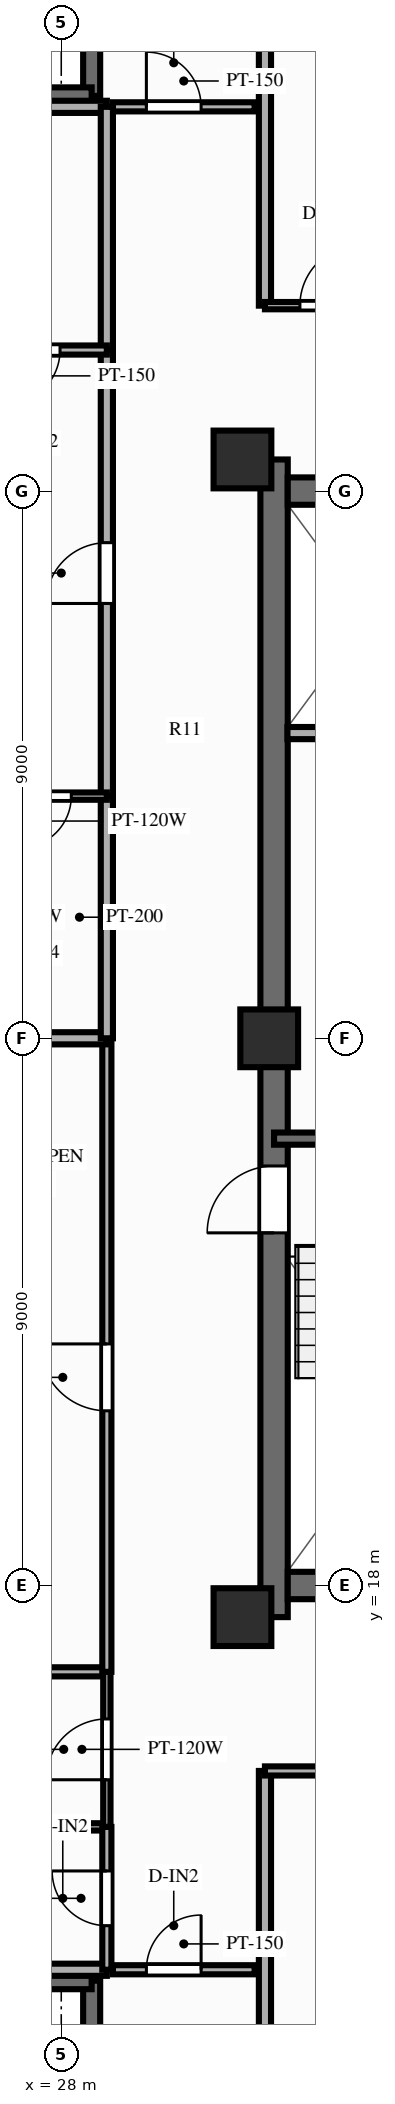
"""IFC4 building model, lengths in metres.
Left out: names, types, materials, properties, quantities, classifications, styles, units other than length and angle.
Written with IfcOpenShell. Run it as: python <this file> out.ifc"""

import sys

from ifc_helpers import new_model, si_unit, direction, frame, frame_2d, origin, origin_2d, place, context, subcontext, project, spatial, rectangle, extrude, source, transform, mapped, element, fill, save


model = new_model("IFC4")
c1 = context("Model", 3, precision=1e-05, world=origin(), true_north=direction((0.0, 1.0)))
c2 = subcontext(c1, "Body", "Model", "MODEL_VIEW")
j1 = project(units=[si_unit("LENGTHUNIT", "METRE"), si_unit("PLANEANGLEUNIT", "RADIAN")], contexts=[c1])
p1 = place(None, origin())
s1 = spatial("IfcSite", under=j1, at=p1, CompositionType="ELEMENT")
p2 = place(p1, origin())
s2 = spatial("IfcBuilding", under=s1, at=p2, CompositionType="ELEMENT")
p3 = place(p2, frame((0.0, 0.0, 249.0)))
s3 = spatial("IfcBuildingStorey", under=s2, at=p3, CompositionType="ELEMENT", Elevation=249.0)
p4 = place(p3, frame((31.5, 17.48, 0.0), z_axis=(0.0, 0.0, 1.0), x_axis=(0.0, 1.0, 0.0)))
e1 = element("IfcWall", 1, at=p4, inside=s3, PredefinedType="SHEAR", context=c2, shape_type="SweptSolid", body=[
    extrude(rectangle(XDim=19.04, YDim=0.45, at=frame_2d((9.52, 0.0))), origin(), (0.0, 0.0, 1.0), 3.2),
])
p5 = place(p4, frame((6.32, 0.0, 0.0)))
e2 = element("IfcOpeningElement", 2, at=p5, cuts=e1, PredefinedType="OPENING", context=c2, shape_type="SweptSolid", body=[
    extrude(rectangle(XDim=1.1, YDim=2.15, at=frame_2d((0.55, 1.075))), frame((0.0, 0.237, 0.0), z_axis=(0.0, -1.0, 0.0), x_axis=(1.0, 0.0, 0.0)), (0.0, 0.0, 1.0), 0.474),
])
p6 = place(p3, frame((31.725, 18.0, 0.0), z_axis=(0.0, 0.0, 1.0), x_axis=(1.0, 0.0, 0.0)))
e3 = element("IfcWall", 3, at=p6, inside=s3, PredefinedType="SHEAR", context=c2, shape_type="SweptSolid", body=[
    extrude(rectangle(XDim=12.55, YDim=0.45, at=frame_2d((6.275, 0.0))), origin(), (0.0, 0.0, 1.0), 3.2),
])
p7 = place(p3, frame((31.725, 36.0, 0.0), z_axis=(0.0, 0.0, 1.0), x_axis=(1.0, 0.0, 0.0)))
e4 = element("IfcWall", 4, at=p7, inside=s3, PredefinedType="SHEAR", context=c2, shape_type="SweptSolid", body=[
    extrude(rectangle(XDim=12.55, YDim=0.45, at=frame_2d((6.275, 0.0))), origin(), (0.0, 0.0, 1.0), 3.2),
])
p8 = place(p7, frame((5.225, 0.0, 0.0), z_axis=(0.0, 0.0, 1.0), x_axis=(-1.0, 0.0, 0.0)))
e5 = element("IfcOpeningElement", 5, at=p8, cuts=e4, PredefinedType="OPENING", context=c2, shape_type="SweptSolid", body=[
    extrude(rectangle(XDim=1.4, YDim=2.15, at=frame_2d((0.7, 1.075))), frame((0.0, 0.237, 0.0), z_axis=(0.0, -1.0, 0.0), x_axis=(1.0, 0.0, 0.0)), (0.0, 0.0, 1.0), 0.474),
])
m1 = source(origin(), c2, "Body", "SweptSolid", [
    extrude(rectangle(XDim=0.95, YDim=0.95, at=origin_2d()), origin(), (0.0, 0.0, 1.0), 3.2),
])
for number, where, z_axis, x_axis in (
    (6, (30.98, 17.48, 0.0), (0.0, 0.0, 1.0), (1.0, 0.0, 0.0)),
    (7, (30.98, 36.52, 0.0), (0.0, 0.0, 1.0), (1.0, 0.0, 0.0)),
    (8, (31.42, 27.0, 0.0), (0.0, 0.0, 1.0), (1.0, 0.0, 0.0)),
):
    element("IfcColumn", number, at=place(p3, frame(where, z_axis=z_axis, x_axis=x_axis)), inside=s3, PredefinedType="COLUMN", context=c2, shape_type="MappedRepresentation", body=[
        mapped(m1, transform((0.0, 0.0, 0.0), scale=1.0)),
    ])
for number, where, z_axis, x_axis in (
    (9, (28.5, 6.08, 0.0), (0.0, 0.0, 1.0), (0.0, 1.0, 0.0)),
    (10, (23.08, 11.5, 0.0), (0.0, 0.0, 1.0), (1.0, 0.0, 0.0)),
    (11, (28.5, 42.5, 0.0), (0.0, 0.0, 1.0), (0.0, 1.0, 0.0)),
    (12, (23.08, 42.5, 0.0), (0.0, 0.0, 1.0), (1.0, 0.0, 0.0)),
):
    element("IfcWall", number, at=place(p3, frame(where, z_axis=z_axis, x_axis=x_axis)), inside=s3, PredefinedType="SOLIDWALL", context=c2, shape_type="SweptSolid", body=[
        extrude(rectangle(XDim=5.42, YDim=0.28, at=frame_2d((2.71, 0.0))), origin(), (0.0, 0.0, 1.0), 2.48),
    ])
p9 = place(p3, frame((31.5, 25.35, 0.0), z_axis=(0.0, 0.0, 1.0), x_axis=(1.0, 0.0, 0.0)))
e13 = element("IfcWall", 13, at=p9, inside=s3, PredefinedType="SOLIDWALL", context=c2, shape_type="SweptSolid", body=[
    extrude(rectangle(XDim=3.93, YDim=0.2, at=frame_2d((1.965, 0.0))), origin(), (0.0, 0.0, 1.0), 2.88),
])
p10 = place(p3, frame((31.72, 32.02, 0.0), z_axis=(0.0, 0.0, 1.0), x_axis=(1.0, 0.0, 0.0)))
e14 = element("IfcWall", 14, at=p10, inside=s3, PredefinedType="PARTITIONING", context=c2, shape_type="SweptSolid", body=[
    extrude(rectangle(XDim=2.8, YDim=0.2, at=frame_2d((1.4, 0.0))), origin(), (0.0, 0.0, 1.0), 2.88),
])
p11 = place(p3, frame((28.85, 11.68, 0.0), z_axis=(0.0, 0.0, 1.0), x_axis=(1.0, 0.0, 0.0)))
e15 = element("IfcWall", 15, at=p11, inside=s3, PredefinedType="PARTITIONING", context=c2, shape_type="SweptSolid", body=[
    extrude(rectangle(XDim=2.33, YDim=0.15, at=frame_2d((1.165, 0.0))), origin(), (0.0, 0.0, 1.0), 2.88),
])
p12 = place(p11, frame((0.55, 0.0, 0.0)))
e16 = element("IfcOpeningElement", 16, at=p12, cuts=e15, PredefinedType="OPENING", context=c2, shape_type="SweptSolid", body=[
    extrude(rectangle(XDim=0.9, YDim=2.1, at=frame_2d((0.45, 1.05))), frame((0.0, 0.087, 0.0), z_axis=(0.0, -1.0, 0.0), x_axis=(1.0, 0.0, 0.0)), (0.0, 0.0, 1.0), 0.174),
])
p13 = place(p3, frame((28.85, 42.32, 0.0), z_axis=(0.0, 0.0, 1.0), x_axis=(1.0, 0.0, 0.0)))
e17 = element("IfcWall", 17, at=p13, inside=s3, PredefinedType="PARTITIONING", context=c2, shape_type="SweptSolid", body=[
    extrude(rectangle(XDim=2.33, YDim=0.15, at=frame_2d((1.165, 0.0))), origin(), (0.0, 0.0, 1.0), 2.88),
])
p14 = place(p13, frame((0.55, 0.0, 0.0)))
e18 = element("IfcOpeningElement", 18, at=p14, cuts=e17, PredefinedType="OPENING", context=c2, shape_type="SweptSolid", body=[
    extrude(rectangle(XDim=0.9, YDim=2.1, at=frame_2d((0.45, 1.05))), frame((0.0, 0.087, 0.0), z_axis=(0.0, -1.0, 0.0), x_axis=(1.0, 0.0, 0.0)), (0.0, 0.0, 1.0), 0.174),
])
p15 = place(p3, frame((31.35, 14.95, 0.0), z_axis=(0.0, 0.0, 1.0), x_axis=(0.0, -1.0, 0.0)))
e19 = element("IfcWall", 19, at=p15, inside=s3, PredefinedType="PARTITIONING", context=c2, shape_type="SweptSolid", body=[
    extrude(rectangle(XDim=8.8, YDim=0.2, at=frame_2d((4.4, 0.0))), origin(), (0.0, 0.0, 1.0), 2.59),
])
p16 = place(p3, frame((31.35, 14.95, 0.0), z_axis=(0.0, 0.0, 1.0), x_axis=(1.0, 0.0, 0.0)))
e20 = element("IfcWall", 20, at=p16, inside=s3, PredefinedType="PARTITIONING", context=c2, shape_type="SweptSolid", body=[
    extrude(rectangle(XDim=6.916, YDim=0.15, at=frame_2d((3.458, 0.0))), origin(), (0.0, 0.0, 1.0), 2.88),
])
p17 = place(p16, frame((2.908, 0.0, 0.0)))
e21 = element("IfcOpeningElement", 21, at=p17, cuts=e20, PredefinedType="OPENING", context=c2, shape_type="SweptSolid", body=[
    extrude(rectangle(XDim=1.1, YDim=2.15, at=frame_2d((0.55, 1.075))), frame((0.0, 0.087, 0.0), z_axis=(0.0, -1.0, 0.0), x_axis=(1.0, 0.0, 0.0)), (0.0, 0.0, 1.0), 0.174),
])
p18 = place(p3, frame((31.35, 39.05, 0.0), z_axis=(0.0, 0.0, 1.0), x_axis=(0.0, 1.0, 0.0)))
e22 = element("IfcWall", 22, at=p18, inside=s3, PredefinedType="PARTITIONING", context=c2, shape_type="SweptSolid", body=[
    extrude(rectangle(XDim=8.8, YDim=0.2, at=frame_2d((4.4, 0.0))), origin(), (0.0, 0.0, 1.0), 2.59),
])
p19 = place(p3, frame((31.35, 39.05, 0.0), z_axis=(0.0, 0.0, 1.0), x_axis=(1.0, 0.0, 0.0)))
e23 = element("IfcWall", 23, at=p19, inside=s3, PredefinedType="PARTITIONING", context=c2, shape_type="SweptSolid", body=[
    extrude(rectangle(XDim=2.15, YDim=0.12, at=frame_2d((1.075, 0.0))), origin(), (0.0, 0.0, 1.0), 2.88),
])
p20 = place(p19, frame((0.575, 0.0, 0.0)))
e24 = element("IfcOpeningElement", 24, at=p20, cuts=e23, PredefinedType="OPENING", context=c2, shape_type="SweptSolid", body=[
    extrude(rectangle(XDim=1.0, YDim=2.1, at=frame_2d((0.5, 1.05))), frame((0.0, 0.072, 0.0), z_axis=(0.0, -1.0, 0.0), x_axis=(1.0, 0.0, 0.0)), (0.0, 0.0, 1.0), 0.144),
])
for number, where, z_axis, x_axis in (
    (25, (28.75, 11.68, 0.0), (0.0, 0.0, 1.0), (-1.0, 0.0, 0.0)),
    (26, (28.75, 42.32, 0.0), (0.0, 0.0, 1.0), (-1.0, 0.0, 0.0)),
):
    element("IfcWall", number, at=place(p3, frame(where, z_axis=z_axis, x_axis=x_axis)), inside=s3, PredefinedType="PARTITIONING", context=c2, shape_type="SweptSolid", body=[
        extrude(rectangle(XDim=5.6, YDim=0.2, at=frame_2d((2.8, 0.0))), origin(), (0.0, 0.0, 1.0), 2.88),
    ])
p21 = place(p3, frame((28.75, 14.03, 0.0), z_axis=(0.0, 0.0, 1.0), x_axis=(-1.0, 0.0, 0.0)))
e27 = element("IfcWall", 27, at=p21, inside=s3, PredefinedType="PARTITIONING", context=c2, shape_type="SweptSolid", body=[
    extrude(rectangle(XDim=3.6, YDim=0.12, at=frame_2d((1.8, 0.0))), origin(), (0.0, 0.0, 1.0), 2.88),
])
p22 = place(p3, frame((28.75, 16.58, 0.0), z_axis=(0.0, 0.0, 1.0), x_axis=(-1.0, 0.0, 0.0)))
e28 = element("IfcWall", 28, at=p22, inside=s3, PredefinedType="PARTITIONING", context=c2, shape_type="SweptSolid", body=[
    extrude(rectangle(XDim=3.6, YDim=0.15, at=frame_2d((1.8, 0.0))), origin(), (0.0, 0.0, 1.0), 2.88),
])
p23 = place(p3, frame((28.75, 11.68, 0.0), z_axis=(0.0, 0.0, 1.0), x_axis=(0.0, 1.0, 0.0)))
e29 = element("IfcWall", 29, at=p23, inside=s3, PredefinedType="PARTITIONING", context=c2, shape_type="SweptSolid", body=[
    extrude(rectangle(XDim=2.35, YDim=0.15, at=frame_2d((1.175, 0.0))), origin(), (0.0, 0.0, 1.0), 2.88),
])
p24 = place(p23, frame((0.725, 0.0, 0.0)))
e30 = element("IfcOpeningElement", 30, at=p24, cuts=e29, PredefinedType="OPENING", context=c2, shape_type="SweptSolid", body=[
    extrude(rectangle(XDim=0.9, YDim=2.1, at=frame_2d((0.45, 1.05))), frame((0.0, 0.087, 0.0), z_axis=(0.0, -1.0, 0.0), x_axis=(1.0, 0.0, 0.0)), (0.0, 0.0, 1.0), 0.174),
])
p25 = place(p3, frame((28.75, 14.03, 0.0), z_axis=(0.0, 0.0, 1.0), x_axis=(0.0, 1.0, 0.0)))
e31 = element("IfcWall", 31, at=p25, inside=s3, PredefinedType="PARTITIONING", context=c2, shape_type="SweptSolid", body=[
    extrude(rectangle(XDim=2.55, YDim=0.12, at=frame_2d((1.275, 0.0))), origin(), (0.0, 0.0, 1.0), 2.88),
])
p26 = place(p25, frame((0.775, 0.0, 0.0)))
e32 = element("IfcOpeningElement", 32, at=p26, cuts=e31, PredefinedType="OPENING", context=c2, shape_type="SweptSolid", body=[
    extrude(rectangle(XDim=1.0, YDim=2.1, at=frame_2d((0.5, 1.05))), frame((0.0, 0.072, 0.0), z_axis=(0.0, -1.0, 0.0), x_axis=(1.0, 0.0, 0.0)), (0.0, 0.0, 1.0), 0.144),
])
p27 = place(p3, frame((28.75, 16.58, 0.0), z_axis=(0.0, 0.0, 1.0), x_axis=(0.0, 1.0, 0.0)))
e33 = element("IfcWall", 33, at=p27, inside=s3, PredefinedType="PARTITIONING", context=c2, shape_type="SweptSolid", body=[
    extrude(rectangle(XDim=10.42, YDim=0.15, at=frame_2d((5.21, 0.0))), origin(), (0.0, 0.0, 1.0), 2.88),
])
p28 = place(p27, frame((4.293, 0.0, 0.0)))
e34 = element("IfcOpeningElement", 34, at=p28, cuts=e33, PredefinedType="OPENING", context=c2, shape_type="SweptSolid", body=[
    extrude(rectangle(XDim=1.1, YDim=2.15, at=frame_2d((0.55, 1.075))), frame((0.0, 0.087, 0.0), z_axis=(0.0, -1.0, 0.0), x_axis=(1.0, 0.0, 0.0)), (0.0, 0.0, 1.0), 0.174),
])
p29 = place(p3, frame((28.75, 27.0, 0.0), z_axis=(0.0, 0.0, 1.0), x_axis=(-1.0, 0.0, 0.0)))
e35 = element("IfcWall", 35, at=p29, inside=s3, PredefinedType="PARTITIONING", context=c2, shape_type="SweptSolid", body=[
    extrude(rectangle(XDim=5.6, YDim=0.2, at=frame_2d((2.8, 0.0))), origin(), (0.0, 0.0, 1.0), 2.88),
])
p30 = place(p3, frame((28.75, 27.0, 0.0), z_axis=(0.0, 0.0, 1.0), x_axis=(0.0, 1.0, 0.0)))
e36 = element("IfcWall", 36, at=p30, inside=s3, PredefinedType="PARTITIONING", context=c2, shape_type="SweptSolid", body=[
    extrude(rectangle(XDim=3.983, YDim=0.2, at=frame_2d((1.992, 0.0))), origin(), (0.0, 0.0, 1.0), 2.88),
])
p31 = place(p3, frame((28.75, 30.983, 0.0), z_axis=(0.0, 0.0, 1.0), x_axis=(0.0, 1.0, 0.0)))
e37 = element("IfcWall", 37, at=p31, inside=s3, PredefinedType="PARTITIONING", context=c2, shape_type="SweptSolid", body=[
    extrude(rectangle(XDim=7.337, YDim=0.2, at=frame_2d((3.668, 0.0))), origin(), (0.0, 0.0, 1.0), 2.88),
])
p32 = place(p31, frame((3.168, 0.0, 0.0)))
e38 = element("IfcOpeningElement", 38, at=p32, cuts=e37, PredefinedType="OPENING", context=c2, shape_type="SweptSolid", body=[
    extrude(rectangle(XDim=1.0, YDim=2.15, at=frame_2d((0.5, 1.075))), frame((0.0, 0.112, 0.0), z_axis=(0.0, -1.0, 0.0), x_axis=(1.0, 0.0, 0.0)), (0.0, 0.0, 1.0), 0.224),
])
p33 = place(p3, frame((28.75, 38.32, 0.0), z_axis=(0.0, 0.0, 1.0), x_axis=(0.0, 1.0, 0.0)))
e39 = element("IfcWall", 39, at=p33, inside=s3, PredefinedType="PARTITIONING", context=c2, shape_type="SweptSolid", body=[
    extrude(rectangle(XDim=4.0, YDim=0.2, at=frame_2d((2.0, 0.0))), origin(), (0.0, 0.0, 1.0), 2.88),
])
p34 = place(p3, frame((28.75, 30.983, 0.0), z_axis=(0.0, 0.0, 1.0), x_axis=(-1.0, 0.0, 0.0)))
e40 = element("IfcWall", 40, at=p34, inside=s3, PredefinedType="PARTITIONING", context=c2, shape_type="SweptSolid", body=[
    extrude(rectangle(XDim=2.02, YDim=0.12, at=frame_2d((1.01, 0.0))), origin(), (0.0, 0.0, 1.0), 2.88),
])
p35 = place(p34, frame((0.585, 0.0, 0.0)))
e41 = element("IfcOpeningElement", 41, at=p35, cuts=e40, PredefinedType="OPENING", context=c2, shape_type="SweptSolid", body=[
    extrude(rectangle(XDim=0.85, YDim=2.05, at=frame_2d((0.425, 1.025))), frame((0.0, 0.072, 0.0), z_axis=(0.0, -1.0, 0.0), x_axis=(1.0, 0.0, 0.0)), (0.0, 0.0, 1.0), 0.144),
])
p36 = place(p3, frame((28.75, 38.32, 0.0), z_axis=(0.0, 0.0, 1.0), x_axis=(-1.0, 0.0, 0.0)))
e42 = element("IfcWall", 42, at=p36, inside=s3, PredefinedType="PARTITIONING", context=c2, shape_type="SweptSolid", body=[
    extrude(rectangle(XDim=2.44, YDim=0.15, at=frame_2d((1.22, 0.0))), origin(), (0.0, 0.0, 1.0), 2.88),
])
p37 = place(p36, frame((0.77, 0.0, 0.0)))
e43 = element("IfcOpeningElement", 43, at=p37, cuts=e42, PredefinedType="OPENING", context=c2, shape_type="SweptSolid", body=[
    extrude(rectangle(XDim=0.9, YDim=2.1, at=frame_2d((0.45, 1.05))), frame((0.0, 0.087, 0.0), z_axis=(0.0, -1.0, 0.0), x_axis=(1.0, 0.0, 0.0)), (0.0, 0.0, 1.0), 0.174),
])
m2 = source(origin(), c2, "Body", "SweptSolid", [
    extrude(rectangle(XDim=1.1, YDim=2.15, at=frame_2d((0.55, 1.075))), frame((0.0, 0.025, 0.0), z_axis=(0.0, -1.0, 0.0), x_axis=(1.0, 0.0, 0.0)), (0.0, 0.0, 1.0), 0.05),
])
p38 = place(p5, origin())
e44 = element("IfcDoor", 44, at=p38, inside=s3, OperationType="SINGLE_SWING_LEFT", PredefinedType="DOOR", context=c2, shape_type="MappedRepresentation", body=[
    mapped(m2, transform((0.0, 0.0, 0.0), scale=1.0)),
])
fill(e2, e44)
m3 = source(origin(), c2, "Body", "SweptSolid", [
    extrude(rectangle(XDim=0.9, YDim=2.1, at=frame_2d((0.45, 1.05))), frame((0.0, 0.025, 0.0), z_axis=(0.0, -1.0, 0.0), x_axis=(1.0, 0.0, 0.0)), (0.0, 0.0, 1.0), 0.05),
])
p39 = place(p12, origin())
e45 = element("IfcDoor", 45, at=p39, inside=s3, OperationType="SINGLE_SWING_RIGHT", PredefinedType="DOOR", context=c2, shape_type="MappedRepresentation", body=[
    mapped(m3, transform((0.0, 0.0, 0.0), scale=1.0)),
])
fill(e16, e45)
p40 = place(p14, origin())
e46 = element("IfcDoor", 46, at=p40, inside=s3, OperationType="SINGLE_SWING_LEFT", PredefinedType="DOOR", context=c2, shape_type="MappedRepresentation", body=[
    mapped(m3, transform((0.0, 0.0, 0.0), scale=1.0)),
])
fill(e18, e46)
m4 = source(origin(), c2, "Body", "SweptSolid", [
    extrude(rectangle(XDim=1.0, YDim=2.1, at=frame_2d((0.5, 1.05))), frame((0.0, 0.025, 0.0), z_axis=(0.0, -1.0, 0.0), x_axis=(1.0, 0.0, 0.0)), (0.0, 0.0, 1.0), 0.05),
])
p41 = place(p20, origin())
e47 = element("IfcDoor", 47, at=p41, inside=s3, OperationType="SINGLE_SWING_RIGHT", PredefinedType="DOOR", context=c2, shape_type="MappedRepresentation", body=[
    mapped(m4, transform((0.0, 0.0, 0.0), scale=1.0)),
])
fill(e24, e47)
p42 = place(p24, origin())
e48 = element("IfcDoor", 48, at=p42, inside=s3, OperationType="SINGLE_SWING_RIGHT", PredefinedType="DOOR", context=c2, shape_type="MappedRepresentation", body=[
    mapped(m3, transform((0.0, 0.0, 0.0), scale=1.0)),
])
fill(e30, e48)
p43 = place(p26, origin())
e49 = element("IfcDoor", 49, at=p43, inside=s3, OperationType="SINGLE_SWING_LEFT", PredefinedType="DOOR", context=c2, shape_type="MappedRepresentation", body=[
    mapped(m4, transform((0.0, 0.0, 0.0), scale=1.0)),
])
fill(e32, e49)
p44 = place(p28, origin())
e50 = element("IfcDoor", 50, at=p44, inside=s3, OperationType="SINGLE_SWING_RIGHT", PredefinedType="DOOR", context=c2, shape_type="MappedRepresentation", body=[
    mapped(m2, transform((0.0, 0.0, 0.0), scale=1.0)),
])
fill(e34, e50)
m5 = source(origin(), c2, "Body", "SweptSolid", [
    extrude(rectangle(XDim=1.0, YDim=2.15, at=frame_2d((0.5, 1.075))), frame((0.0, 0.025, 0.0), z_axis=(0.0, -1.0, 0.0), x_axis=(1.0, 0.0, 0.0)), (0.0, 0.0, 1.0), 0.05),
])
p45 = place(p32, origin())
e51 = element("IfcDoor", 51, at=p45, inside=s3, OperationType="SINGLE_SWING_LEFT", PredefinedType="DOOR", context=c2, shape_type="MappedRepresentation", body=[
    mapped(m5, transform((0.0, 0.0, 0.0), scale=1.0)),
])
fill(e38, e51)
m6 = source(origin(), c2, "Body", "SweptSolid", [
    extrude(rectangle(XDim=0.85, YDim=2.05, at=frame_2d((0.425, 1.025))), frame((0.0, 0.025, 0.0), z_axis=(0.0, -1.0, 0.0), x_axis=(1.0, 0.0, 0.0)), (0.0, 0.0, 1.0), 0.05),
])
p46 = place(p35, origin())
e52 = element("IfcDoor", 52, at=p46, inside=s3, OperationType="SINGLE_SWING_RIGHT", PredefinedType="DOOR", context=c2, shape_type="MappedRepresentation", body=[
    mapped(m6, transform((0.0, 0.0, 0.0), scale=1.0)),
])
fill(e41, e52)
p47 = place(p37, origin())
e53 = element("IfcDoor", 53, at=p47, inside=s3, OperationType="SINGLE_SWING_RIGHT", PredefinedType="DOOR", context=c2, shape_type="MappedRepresentation", body=[
    mapped(m3, transform((0.0, 0.0, 0.0), scale=1.0)),
])
fill(e43, e53)
save(model, sys.argv[1])
